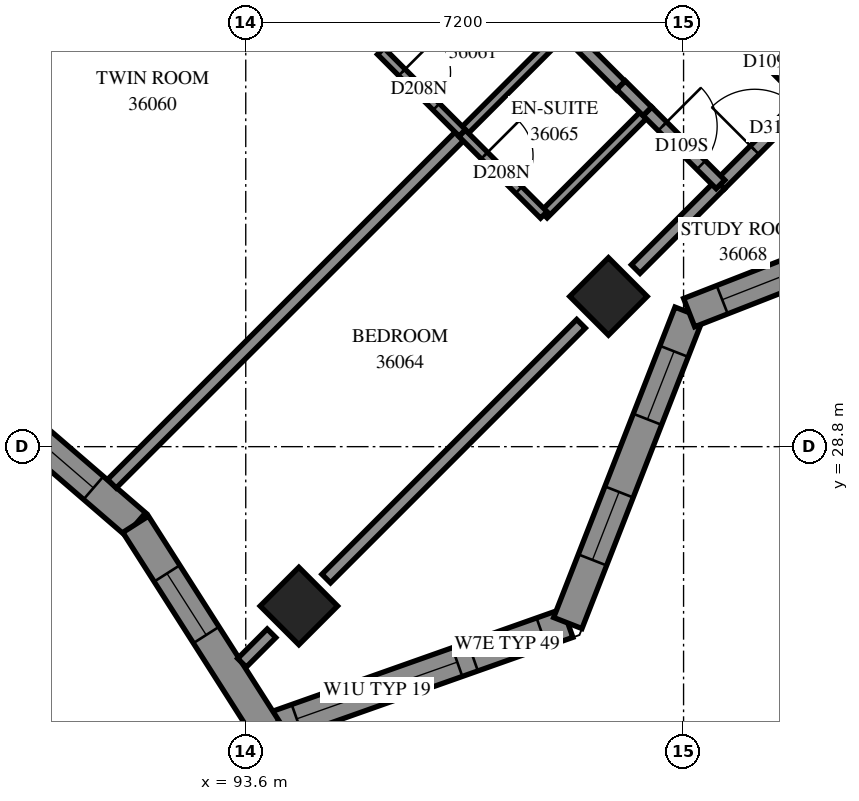
"""IFC4 building model, lengths in metres.
Left out: names, types, materials, properties, quantities, classifications, styles, units other than length and angle.
Written with IfcOpenShell. Run it as: python <this file> out.ifc"""

import sys

from ifc_helpers import new_model, si_unit, direction, frame, frame_2d, origin, origin_2d, place, context, subcontext, project, spatial, polyline, rectangle, outline, extrude, element, fill, save


model = new_model("IFC4")
c1 = context("Model", 3, precision=1e-05, world=origin(), true_north=direction((0.0, 1.0)))
c2 = subcontext(c1, "Body", "Model", "MODEL_VIEW")
j1 = project(units=[si_unit("LENGTHUNIT", "METRE"), si_unit("PLANEANGLEUNIT", "RADIAN")], contexts=[c1])
p1 = place(None, origin())
s1 = spatial("IfcSite", under=j1, at=p1, CompositionType="ELEMENT")
p2 = place(p1, origin())
s2 = spatial("IfcBuilding", under=s1, at=p2, CompositionType="ELEMENT")
p3 = place(p2, frame((0.0, 0.0, 135.4)))
s3 = spatial("IfcBuildingStorey", under=s2, at=p3, CompositionType="ELEMENT", Elevation=135.4)
for number, where, z_axis, x_axis in (
    (1, (99.565, 31.271, 0.0), (0.0, 0.0, 1.0), (0.707, -0.707, 0.0)),
    (2, (94.474, 26.18, 0.0), (0.0, 0.0, 1.0), (0.707, -0.707, 0.0)),
):
    element("IfcColumn", number, at=place(p3, frame(where, z_axis=z_axis, x_axis=x_axis)), inside=s3, PredefinedType="COLUMN", context=c2, shape_type="SweptSolid", body=[
        extrude(rectangle(XDim=0.9, YDim=0.9, at=origin_2d()), origin(), (0.0, 0.0, 1.0), 3.1),
    ])
p4 = place(p3, frame((93.941, 24.148, 0.0), z_axis=(0.0, 0.0, 1.0), x_axis=(0.942814567, 0.3333177047, 0.0)))
e3 = element("IfcWall", 3, at=p4, inside=s3, PredefinedType="SOLIDWALL", context=c2, shape_type="SweptSolid", body=[
    extrude(outline(polyline([(-0.199, -0.25), (5.37, -0.25), (5.141, 0.25), (0.199, 0.25), (-0.199, -0.25)])), origin(), (0.0, 0.0, 1.0), 3.1),
])
p5 = place(p4, frame((0.528, 0.0, 0.45)))
e4 = element("IfcOpeningElement", 4, at=p5, cuts=e3, PredefinedType="OPENING", context=c2, shape_type="SweptSolid", body=[
    extrude(rectangle(XDim=2.8, YDim=2.5, at=frame_2d((1.4, 1.25))), frame((0.0, 0.26, 0.0), z_axis=(0.0, -1.0, 0.0), x_axis=(1.0, 0.0, 0.0)), (0.0, 0.0, 1.0), 0.52),
])
p6 = place(p4, frame((3.599, 0.0, 0.45)))
e5 = element("IfcOpeningElement", 5, at=p6, cuts=e3, PredefinedType="OPENING", context=c2, shape_type="SweptSolid", body=[
    extrude(rectangle(XDim=1.2, YDim=2.5, at=frame_2d((0.6, 1.25))), frame((0.0, 0.26, 0.0), z_axis=(0.0, -1.0, 0.0), x_axis=(1.0, 0.0, 0.0)), (0.0, 0.0, 1.0), 0.52),
])
p7 = place(p3, frame((98.896, 25.9, 0.0), z_axis=(0.0, 0.0, 1.0), x_axis=(0.364156483, 0.9313377775, 0.0)))
e6 = element("IfcWall", 6, at=p7, inside=s3, PredefinedType="SOLIDWALL", context=c2, shape_type="SweptSolid", body=[
    extrude(outline(polyline([(-0.114, -0.25), (5.371, -0.25), (5.59, 0.25), (0.114, 0.25), (-0.114, -0.25)])), origin(), (0.0, 0.0, 1.0), 3.1),
])
p8 = place(p7, frame((1.114, 0.0, 0.45)))
e7 = element("IfcOpeningElement", 7, at=p8, cuts=e6, PredefinedType="OPENING", context=c2, shape_type="SweptSolid", body=[
    extrude(rectangle(XDim=1.2, YDim=2.5, at=frame_2d((0.6, 1.25))), frame((0.0, 0.26, 0.0), z_axis=(0.0, -1.0, 0.0), x_axis=(1.0, 0.0, 0.0)), (0.0, 0.0, 1.0), 0.52),
])
p9 = place(p7, frame((3.597, 0.0, 0.45)))
e8 = element("IfcOpeningElement", 8, at=p9, cuts=e6, PredefinedType="OPENING", context=c2, shape_type="SweptSolid", body=[
    extrude(rectangle(XDim=1.2, YDim=2.5, at=frame_2d((0.6, 1.25))), frame((0.0, 0.26, 0.0), z_axis=(0.0, -1.0, 0.0), x_axis=(1.0, 0.0, 0.0)), (0.0, 0.0, 1.0), 0.52),
])
p10 = place(p3, frame((100.892, 31.004, 0.0), z_axis=(0.0, 0.0, 1.0), x_axis=(0.9313377775, 0.364156483, 0.0)))
e9 = element("IfcWall", 9, at=p10, inside=s3, PredefinedType="SOLIDWALL", context=c2, shape_type="SweptSolid", body=[
    extrude(outline(polyline([(0.11, -0.25), (5.595, -0.25), (5.366, 0.25), (-0.11, 0.25), (0.11, -0.25)])), origin(), (0.0, 0.0, 1.0), 3.1),
])
p11 = place(p10, frame((0.583, 0.0, 0.45)))
e10 = element("IfcOpeningElement", 10, at=p11, cuts=e9, PredefinedType="OPENING", context=c2, shape_type="SweptSolid", body=[
    extrude(rectangle(XDim=2.8, YDim=2.5, at=frame_2d((1.4, 1.25))), frame((0.0, 0.26, 0.0), z_axis=(0.0, -1.0, 0.0), x_axis=(1.0, 0.0, 0.0)), (0.0, 0.0, 1.0), 0.52),
])
p12 = place(p3, frame((88.687, 30.199, 0.0), z_axis=(0.0, 0.0, 1.0), x_axis=(0.7572038427, -0.6531786437, 0.0)))
e11 = element("IfcWall", 11, at=p12, inside=s3, PredefinedType="SOLIDWALL", context=c2, shape_type="SweptSolid", body=[
    extrude(outline(polyline([(-0.018, -0.25), (4.059, -0.25), (4.133, 0.25), (0.018, 0.25), (-0.018, -0.25)])), origin(), (0.0, 0.0, 1.0), 3.1),
])
p13 = place(p12, frame((0.381, 0.0, 0.45)))
e12 = element("IfcOpeningElement", 12, at=p13, cuts=e11, PredefinedType="OPENING", context=c2, shape_type="SweptSolid", body=[
    extrude(rectangle(XDim=2.8, YDim=2.5, at=frame_2d((1.4, 1.25))), frame((0.0, 0.26, 0.0), z_axis=(0.0, -1.0, 0.0), x_axis=(1.0, 0.0, 0.0)), (0.0, 0.0, 1.0), 0.52),
])
p14 = place(p3, frame((91.789, 27.523, 0.0), z_axis=(0.0, 0.0, 1.0), x_axis=(0.537613952, -0.8431911044, 0.0)))
e13 = element("IfcWall", 13, at=p14, inside=s3, PredefinedType="SOLIDWALL", context=c2, shape_type="SweptSolid", body=[
    extrude(outline(polyline([(0.037, -0.25), (4.202, -0.25), (3.804, 0.25), (-0.037, 0.25), (0.037, -0.25)])), origin(), (0.0, 0.0, 1.0), 3.1),
])
p15 = place(p14, frame((0.959, 0.0, 0.45)))
e14 = element("IfcOpeningElement", 14, at=p15, cuts=e13, PredefinedType="OPENING", context=c2, shape_type="SweptSolid", body=[
    extrude(rectangle(XDim=1.2, YDim=2.5, at=frame_2d((0.6, 1.25))), frame((0.0, 0.26, 0.0), z_axis=(0.0, -1.0, 0.0), x_axis=(1.0, 0.0, 0.0)), (0.0, 0.0, 1.0), 0.52),
])
p16 = place(p3, frame((86.332, 33.313, 0.0), z_axis=(0.0, 0.0, 1.0), x_axis=(0.7071020252, 0.7071115371, 0.0)))
e15 = element("IfcWall", 15, at=p16, inside=s3, PredefinedType="PARTITIONING", context=c2, shape_type="SweptSolid", body=[
    extrude(rectangle(XDim=10.513, YDim=0.2, at=frame_2d((5.257, 0.0))), origin(), (0.0, 0.0, 1.0), 3.1),
])
p17 = place(p3, frame((93.127, 41.379, 0.0), z_axis=(0.0, 0.0, 1.0), x_axis=(0.7071067812, -0.7071067812, 0.0)))
e16 = element("IfcWall", 16, at=p17, inside=s3, PredefinedType="PARTITIONING", context=c2, shape_type="SweptSolid", body=[
    extrude(rectangle(XDim=9.39, YDim=0.2, at=frame_2d((4.695, 0.0))), origin(), (0.0, 0.0, 1.0), 3.1),
])
p18 = place(p17, frame((3.2, 0.0, 0.0)))
e17 = element("IfcOpeningElement", 17, at=p18, cuts=e16, PredefinedType="OPENING", context=c2, shape_type="SweptSolid", body=[
    extrude(rectangle(XDim=0.9, YDim=2.1, at=frame_2d((0.45, 1.05))), frame((0.0, 0.11, 0.0), z_axis=(0.0, -1.0, 0.0), x_axis=(1.0, 0.0, 0.0)), (0.0, 0.0, 1.0), 0.22),
])
p19 = place(p3, frame((86.837, 35.091, 0.0), z_axis=(0.0, 0.0, 1.0), x_axis=(0.7071067812, 0.7071067812, 0.0)))
e18 = element("IfcWall", 18, at=p19, inside=s3, PredefinedType="PARTITIONING", context=c2, shape_type="SweptSolid", body=[
    extrude(rectangle(XDim=8.898, YDim=0.2, at=frame_2d((4.449, 0.0))), origin(), (0.0, 0.0, 1.0), 3.1),
])
p20 = place(p19, frame((7.7, 0.0, 0.0)))
e19 = element("IfcOpeningElement", 19, at=p20, cuts=e18, PredefinedType="OPENING", context=c2, shape_type="SweptSolid", body=[
    extrude(rectangle(XDim=1.0, YDim=2.1, at=frame_2d((0.5, 1.05))), frame((0.0, 0.11, 0.0), z_axis=(0.0, -1.0, 0.0), x_axis=(1.0, 0.0, 0.0)), (0.0, 0.0, 1.0), 0.22),
])
p21 = place(p3, frame((91.398, 28.19, 0.0), z_axis=(0.0, 0.0, 1.0), x_axis=(0.7072294342, 0.7069841069, 0.0)))
e20 = element("IfcWall", 20, at=p21, inside=s3, PredefinedType="PARTITIONING", context=c2, shape_type="SweptSolid", body=[
    extrude(rectangle(XDim=8.152, YDim=0.2, at=frame_2d((4.076, 0.0))), origin(), (0.0, 0.0, 1.0), 3.1),
])
p22 = place(p3, frame((94.923, 26.631, 0.0), z_axis=(0.0, 0.0, 1.0), x_axis=(0.7071067812, 0.7071067812, 0.0)))
e21 = element("IfcWall", 21, at=p22, inside=s3, PredefinedType="PARTITIONING", context=c2, shape_type="SweptSolid", body=[
    extrude(rectangle(XDim=5.926, YDim=0.2, at=frame_2d((2.963, 0.0))), origin(), (0.0, 0.0, 1.0), 2.6),
])
p23 = place(p3, frame((98.503, 32.615, 0.0), z_axis=(0.0, 0.0, 1.0), x_axis=(0.7071067812, 0.7071067812, 0.0)))
e22 = element("IfcWall", 22, at=p23, inside=s3, PredefinedType="PARTITIONING", context=c2, shape_type="SweptSolid", body=[
    extrude(rectangle(XDim=2.401, YDim=0.15, at=frame_2d((1.201, 0.0))), origin(), (0.0, 0.0, 1.0), 3.1),
])
for number, where, z_axis, x_axis in (
    (23, (97.161, 33.959, 0.0), (0.0, 0.0, 1.0), (0.707, 0.707, 0.0)),
    (24, (95.817, 35.303, 0.0), (0.0, 0.0, 1.0), (0.707, 0.707, 0.0)),
):
    element("IfcWall", number, at=place(p3, frame(where, z_axis=z_axis, x_axis=x_axis)), inside=s3, PredefinedType="PARTITIONING", context=c2, shape_type="SweptSolid", body=[
        extrude(rectangle(XDim=2.398, YDim=0.15, at=frame_2d((1.199, 0.0))), origin(), (0.0, 0.0, 1.0), 3.1),
    ])
p24 = place(p3, frame((101.403, 33.111, 0.0), z_axis=(0.0, 0.0, 1.0), x_axis=(0.7071067812, 0.7071067812, 0.0)))
e25 = element("IfcWall", 25, at=p24, inside=s3, PredefinedType="PARTITIONING", context=c2, shape_type="SweptSolid", body=[
    extrude(rectangle(XDim=2.0, YDim=0.2, at=frame_2d((1.0, 0.0))), origin(), (0.0, 0.0, 1.0), 2.6),
])
p25 = place(p24, frame((0.802, 0.0, 0.0)))
e26 = element("IfcOpeningElement", 26, at=p25, cuts=e25, PredefinedType="OPENING", context=c2, shape_type="SweptSolid", body=[
    extrude(rectangle(XDim=1.0, YDim=2.1, at=frame_2d((0.5, 1.05))), frame((0.0, 0.11, 0.0), z_axis=(0.0, -1.0, 0.0), x_axis=(1.0, 0.0, 0.0)), (0.0, 0.0, 1.0), 0.22),
])
p26 = place(p3, frame((100.013, 31.721, 0.0), z_axis=(0.0, 0.0, 1.0), x_axis=(0.7071067812, 0.7071067812, 0.0)))
e27 = element("IfcWall", 27, at=p26, inside=s3, PredefinedType="PARTITIONING", context=c2, shape_type="SweptSolid", body=[
    extrude(rectangle(XDim=1.966, YDim=0.2, at=frame_2d((0.983, 0.0))), origin(), (0.0, 0.0, 1.0), 2.6),
])
p27 = place(p3, frame((95.82, 35.304, 0.0), z_axis=(0.0, 0.0, 1.0), x_axis=(0.7065800724, -0.7076330979, 0.0)))
e28 = element("IfcWall", 28, at=p27, inside=s3, PredefinedType="PARTITIONING", context=c2, shape_type="SweptSolid", body=[
    extrude(rectangle(XDim=1.899, YDim=0.15, at=frame_2d((0.95, 0.0))), origin(), (0.0, 0.0, 1.0), 3.1),
])
p28 = place(p27, frame((0.493, 0.0, 0.0)))
e29 = element("IfcOpeningElement", 29, at=p28, cuts=e28, PredefinedType="OPENING", context=c2, shape_type="SweptSolid", body=[
    extrude(rectangle(XDim=0.8, YDim=2.1, at=frame_2d((0.4, 1.05))), frame((0.0, 0.085, 0.0), z_axis=(0.0, -1.0, 0.0), x_axis=(1.0, 0.0, 0.0)), (0.0, 0.0, 1.0), 0.17),
])
p29 = place(p3, frame((97.159, 33.953, 0.0), z_axis=(0.0, 0.0, 1.0), x_axis=(0.7071067812, -0.7071067812, 0.0)))
e30 = element("IfcWall", 30, at=p29, inside=s3, PredefinedType="PARTITIONING", context=c2, shape_type="SweptSolid", body=[
    extrude(rectangle(XDim=1.898, YDim=0.15, at=frame_2d((0.949, 0.0))), origin(), (0.0, 0.0, 1.0), 3.1),
])
p30 = place(p29, frame((0.517, 0.0, 0.0)))
e31 = element("IfcOpeningElement", 31, at=p30, cuts=e30, PredefinedType="OPENING", context=c2, shape_type="SweptSolid", body=[
    extrude(rectangle(XDim=0.8, YDim=2.1, at=frame_2d((0.4, 1.05))), frame((0.0, 0.085, 0.0), z_axis=(0.0, -1.0, 0.0), x_axis=(1.0, 0.0, 0.0)), (0.0, 0.0, 1.0), 0.17),
])
p31 = place(p3, frame((100.205, 34.315, 0.0), z_axis=(0.0, 0.0, 1.0), x_axis=(0.7071067812, -0.7071067812, 0.0)))
e32 = element("IfcWall", 32, at=p31, inside=s3, PredefinedType="PARTITIONING", context=c2, shape_type="SweptSolid", body=[
    extrude(rectangle(XDim=1.7, YDim=0.2, at=frame_2d((0.85, 0.0))), origin(), (0.0, 0.0, 1.0), 3.1),
])
p32 = place(p31, frame((0.35, 0.0, 0.0)))
e33 = element("IfcOpeningElement", 33, at=p32, cuts=e32, PredefinedType="OPENING", context=c2, shape_type="SweptSolid", body=[
    extrude(rectangle(XDim=0.9, YDim=2.1, at=frame_2d((0.45, 1.05))), frame((0.0, 0.11, 0.0), z_axis=(0.0, -1.0, 0.0), x_axis=(1.0, 0.0, 0.0)), (0.0, 0.0, 1.0), 0.22),
])
p33 = place(p3, frame((101.619, 35.729, 0.0), z_axis=(0.0, 0.0, 1.0), x_axis=(0.7071067812, -0.7071067812, 0.0)))
e34 = element("IfcWall", 34, at=p33, inside=s3, PredefinedType="PARTITIONING", context=c2, shape_type="SweptSolid", body=[
    extrude(rectangle(XDim=1.7, YDim=0.2, at=frame_2d((0.85, 0.0))), origin(), (0.0, 0.0, 1.0), 3.1),
])
p34 = place(p33, frame((0.4, 0.0, 0.0)))
e35 = element("IfcOpeningElement", 35, at=p34, cuts=e34, PredefinedType="OPENING", context=c2, shape_type="SweptSolid", body=[
    extrude(rectangle(XDim=0.9, YDim=2.1, at=frame_2d((0.45, 1.05))), frame((0.0, 0.11, 0.0), z_axis=(0.0, -1.0, 0.0), x_axis=(1.0, 0.0, 0.0)), (0.0, 0.0, 1.0), 0.22),
])
p35 = place(p3, frame((93.538, 25.245, 0.0), z_axis=(0.0, 0.0, 1.0), x_axis=(0.7071067812, 0.7071067812, 0.0)))
e36 = element("IfcWall", 36, at=p35, inside=s3, PredefinedType="PARTITIONING", context=c2, shape_type="SweptSolid", body=[
    extrude(rectangle(XDim=0.686, YDim=0.2, at=frame_2d((0.343, 0.0))), origin(), (0.0, 0.0, 1.0), 3.1),
])
p36 = place(p3, frame((99.772, 34.744, 0.0), z_axis=(0.0, 0.0, 1.0), x_axis=(0.7087454925, -0.7054642634, 0.0)))
e37 = element("IfcWall", 37, at=p36, inside=s3, PredefinedType="PARTITIONING", context=c2, shape_type="SweptSolid", body=[
    extrude(rectangle(XDim=0.61, YDim=0.2, at=frame_2d((0.305, 0.0))), origin(), (0.0, 0.0, 1.0), 3.1),
])
p37 = place(p5, origin())
e38 = element("IfcWindow", 38, at=p37, inside=s3, PartitioningType="SINGLE_PANEL", PredefinedType="WINDOW", context=c2, shape_type="SweptSolid", body=[
    extrude(rectangle(XDim=2.8, YDim=2.5, at=frame_2d((1.4, 1.25))), frame((0.0, 0.18, 0.0), z_axis=(0.0, -1.0, 0.0), x_axis=(1.0, 0.0, 0.0)), (0.0, 0.0, 1.0), 0.06),
])
fill(e4, e38)
p38 = place(p6, origin())
e39 = element("IfcWindow", 39, at=p38, inside=s3, PartitioningType="SINGLE_PANEL", PredefinedType="WINDOW", context=c2, shape_type="SweptSolid", body=[
    extrude(rectangle(XDim=1.2, YDim=2.5, at=frame_2d((0.6, 1.25))), frame((0.0, 0.18, 0.0), z_axis=(0.0, -1.0, 0.0), x_axis=(1.0, 0.0, 0.0)), (0.0, 0.0, 1.0), 0.06),
])
fill(e5, e39)
p39 = place(p8, origin())
e40 = element("IfcWindow", 40, at=p39, inside=s3, PartitioningType="SINGLE_PANEL", PredefinedType="WINDOW", context=c2, shape_type="SweptSolid", body=[
    extrude(rectangle(XDim=1.2, YDim=2.5, at=frame_2d((0.6, 1.25))), frame((0.0, 0.18, 0.0), z_axis=(0.0, -1.0, 0.0), x_axis=(1.0, 0.0, 0.0)), (0.0, 0.0, 1.0), 0.06),
])
fill(e7, e40)
p40 = place(p9, origin())
e41 = element("IfcWindow", 41, at=p40, inside=s3, PartitioningType="SINGLE_PANEL", PredefinedType="WINDOW", context=c2, shape_type="SweptSolid", body=[
    extrude(rectangle(XDim=1.2, YDim=2.5, at=frame_2d((0.6, 1.25))), frame((0.0, 0.18, 0.0), z_axis=(0.0, -1.0, 0.0), x_axis=(1.0, 0.0, 0.0)), (0.0, 0.0, 1.0), 0.06),
])
fill(e8, e41)
p41 = place(p11, origin())
e42 = element("IfcWindow", 42, at=p41, inside=s3, PartitioningType="SINGLE_PANEL", PredefinedType="WINDOW", context=c2, shape_type="SweptSolid", body=[
    extrude(rectangle(XDim=2.8, YDim=2.5, at=frame_2d((1.4, 1.25))), frame((0.0, 0.18, 0.0), z_axis=(0.0, -1.0, 0.0), x_axis=(1.0, 0.0, 0.0)), (0.0, 0.0, 1.0), 0.06),
])
fill(e10, e42)
p42 = place(p13, origin())
e43 = element("IfcWindow", 43, at=p42, inside=s3, PartitioningType="SINGLE_PANEL", PredefinedType="WINDOW", context=c2, shape_type="SweptSolid", body=[
    extrude(rectangle(XDim=2.8, YDim=2.5, at=frame_2d((1.4, 1.25))), frame((0.0, 0.18, 0.0), z_axis=(0.0, -1.0, 0.0), x_axis=(1.0, 0.0, 0.0)), (0.0, 0.0, 1.0), 0.06),
])
fill(e12, e43)
p43 = place(p15, origin())
e44 = element("IfcWindow", 44, at=p43, inside=s3, PartitioningType="SINGLE_PANEL", PredefinedType="WINDOW", context=c2, shape_type="SweptSolid", body=[
    extrude(rectangle(XDim=1.2, YDim=2.5, at=frame_2d((0.6, 1.25))), frame((0.0, 0.18, 0.0), z_axis=(0.0, -1.0, 0.0), x_axis=(1.0, 0.0, 0.0)), (0.0, 0.0, 1.0), 0.06),
])
fill(e14, e44)
p44 = place(p28, origin())
e45 = element("IfcDoor", 45, at=p44, inside=s3, OperationType="SINGLE_SWING_RIGHT", PredefinedType="DOOR", context=c2, shape_type="SweptSolid", body=[
    extrude(rectangle(XDim=0.8, YDim=2.1, at=frame_2d((0.4, 1.05))), frame((0.0, 0.025, 0.0), z_axis=(0.0, -1.0, 0.0), x_axis=(1.0, 0.0, 0.0)), (0.0, 0.0, 1.0), 0.05),
])
fill(e29, e45)
p45 = place(p32, origin())
e46 = element("IfcDoor", 46, at=p45, inside=s3, OperationType="SINGLE_SWING_LEFT", PredefinedType="DOOR", context=c2, shape_type="SweptSolid", body=[
    extrude(rectangle(XDim=0.9, YDim=2.1, at=frame_2d((0.45, 1.05))), frame((0.0, 0.025, 0.0), z_axis=(0.0, -1.0, 0.0), x_axis=(1.0, 0.0, 0.0)), (0.0, 0.0, 1.0), 0.05),
])
fill(e33, e46)
p46 = place(p30, origin())
e47 = element("IfcDoor", 47, at=p46, inside=s3, OperationType="SINGLE_SWING_RIGHT", PredefinedType="DOOR", context=c2, shape_type="SweptSolid", body=[
    extrude(rectangle(XDim=0.8, YDim=2.1, at=frame_2d((0.4, 1.05))), frame((0.0, 0.025, 0.0), z_axis=(0.0, -1.0, 0.0), x_axis=(1.0, 0.0, 0.0)), (0.0, 0.0, 1.0), 0.05),
])
fill(e31, e47)
p47 = place(p34, origin())
e48 = element("IfcDoor", 48, at=p47, inside=s3, OperationType="SINGLE_SWING_RIGHT", PredefinedType="DOOR", context=c2, shape_type="SweptSolid", body=[
    extrude(rectangle(XDim=0.9, YDim=2.1, at=frame_2d((0.45, 1.05))), frame((0.0, 0.025, 0.0), z_axis=(0.0, -1.0, 0.0), x_axis=(1.0, 0.0, 0.0)), (0.0, 0.0, 1.0), 0.05),
])
fill(e35, e48)
p48 = place(p25, origin())
e49 = element("IfcDoor", 49, at=p48, inside=s3, OperationType="SINGLE_SWING_RIGHT", PredefinedType="DOOR", context=c2, shape_type="SweptSolid", body=[
    extrude(rectangle(XDim=1.0, YDim=2.1, at=frame_2d((0.5, 1.05))), frame((0.0, 0.025, 0.0), z_axis=(0.0, -1.0, 0.0), x_axis=(1.0, 0.0, 0.0)), (0.0, 0.0, 1.0), 0.05),
])
fill(e26, e49)
save(model, sys.argv[1])
